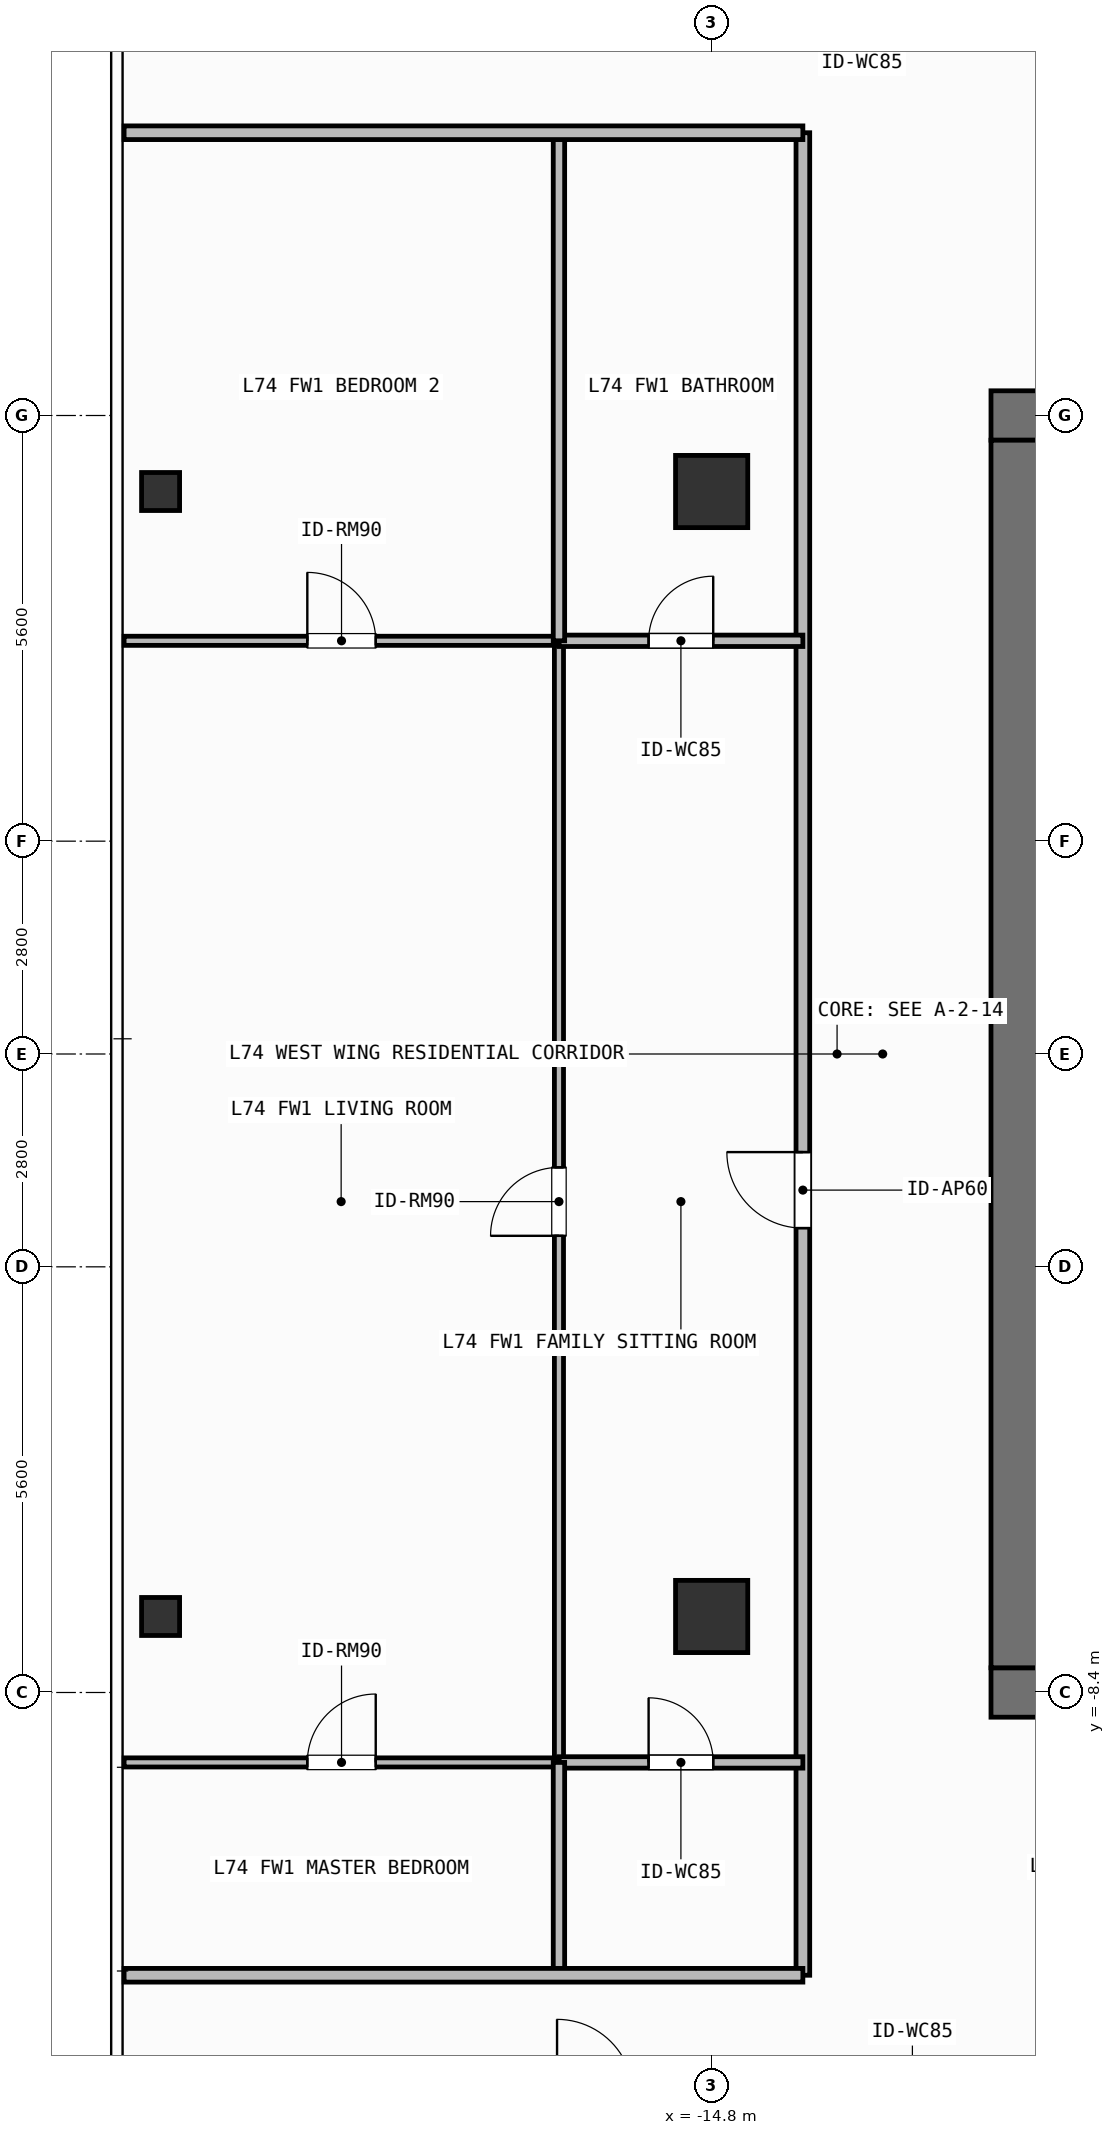
"""IFC4 building model, lengths in metres.
Left out: names, types, materials, properties, quantities, classifications, styles, units other than length and angle.
Written with IfcOpenShell. Run it as: python <this file> out.ifc"""

import sys

from ifc_helpers import new_model, si_unit, direction, frame, frame_2d, origin, origin_2d, place, context, subcontext, project, spatial, rectangle, hollow_rectangle, extrude, element, fill, save


model = new_model("IFC4")
c1 = context("Model", 3, precision=1e-05, world=origin(), true_north=direction((0.0, 1.0)))
c2 = subcontext(c1, "Body", "Model", "MODEL_VIEW")
j1 = project(units=[si_unit("LENGTHUNIT", "METRE"), si_unit("PLANEANGLEUNIT", "RADIAN")], contexts=[c1])
p1 = place(None, origin())
s1 = spatial("IfcSite", under=j1, at=p1, CompositionType="ELEMENT")
p2 = place(p1, origin())
s2 = spatial("IfcBuilding", under=s1, at=p2, CompositionType="ELEMENT")
p3 = place(p2, frame((0.0, 0.0, 301.5)))
s3 = spatial("IfcBuildingStorey", under=s2, at=p3, CompositionType="ELEMENT", Elevation=301.5)
for number, where, z_axis, x_axis in (
    (1, (-11.125, -8.4, 0.0), (0.0, 0.0, 1.0), (1.0, 0.0, 0.0)),
    (2, (-11.125, 8.4, 0.0), (0.0, 0.0, 1.0), (1.0, 0.0, 0.0)),
):
    element("IfcWall", number, at=place(p3, frame(where, z_axis=z_axis, x_axis=x_axis)), inside=s3, PredefinedType="SHEAR", context=c2, shape_type="SweptSolid", body=[
        extrude(rectangle(XDim=1.425, YDim=0.65, at=frame_2d((0.712, 0.0))), origin(), (0.0, 0.0, 1.0), 3.9),
    ])
p4 = place(p3, frame((-10.8, -8.075, 0.0), z_axis=(0.0, 0.0, 1.0), x_axis=(0.0, 1.0, 0.0)))
e3 = element("IfcWall", 3, at=p4, inside=s3, PredefinedType="SHEAR", context=c2, shape_type="SweptSolid", body=[
    extrude(rectangle(XDim=16.15, YDim=0.65, at=frame_2d((8.075, 0.0))), origin(), (0.0, 0.0, 1.0), 3.9),
])
for number, where, z_axis, x_axis in (
    (4, (-14.8, -7.4, 0.0), (0.0, 0.0, 1.0), (1.0, 0.0, 0.0)),
    (5, (-14.8, 7.4, 0.0), (0.0, 0.0, 1.0), (1.0, 0.0, 0.0)),
):
    element("IfcColumn", number, at=place(p3, frame(where, z_axis=z_axis, x_axis=x_axis)), inside=s3, PredefinedType="COLUMN", context=c2, shape_type="SweptSolid", body=[
        extrude(rectangle(XDim=0.95, YDim=0.95, at=origin_2d()), origin(), (0.0, 0.0, 1.0), 3.9),
    ])
for number, where, z_axis, x_axis in (
    (6, (-22.05, -7.4, 0.0), (0.0, 0.0, 1.0), (1.0, 0.0, 0.0)),
    (7, (-22.05, 7.4, 0.0), (0.0, 0.0, 1.0), (1.0, 0.0, 0.0)),
):
    element("IfcColumn", number, at=place(p3, frame(where, z_axis=z_axis, x_axis=x_axis)), inside=s3, PredefinedType="COLUMN", context=c2, shape_type="SweptSolid", body=[
        extrude(hollow_rectangle(XDim=0.5, YDim=0.5, WallThickness=0.025, at=origin_2d()), origin(), (0.0, 0.0, 1.0), 3.9),
    ])
p5 = place(p3, frame((-13.6, -12.12, 0.0), z_axis=(0.0, 0.0, 1.0), x_axis=(0.0, 1.0, 0.0)))
e8 = element("IfcWall", 8, at=p5, inside=s3, PredefinedType="PARTITIONING", context=c2, shape_type="SweptSolid", body=[
    extrude(rectangle(XDim=24.24, YDim=0.18, at=frame_2d((12.12, 0.0))), origin(), (0.0, 0.0, 1.0), 3.68),
])
p6 = place(p5, frame((9.829, 0.0, 0.0)))
e9 = element("IfcOpeningElement", 9, at=p6, cuts=e8, PredefinedType="OPENING", context=c2, shape_type="SweptSolid", body=[
    extrude(rectangle(XDim=1.0, YDim=2.2, at=frame_2d((0.5, 1.1))), frame((0.0, 0.1, 0.0), z_axis=(0.0, -1.0, 0.0), x_axis=(1.0, 0.0, 0.0)), (0.0, 0.0, 1.0), 0.2),
])
p7 = place(p3, frame((-16.809, -9.32, 0.0), z_axis=(0.0, 0.0, 1.0), x_axis=(0.0, 1.0, 0.0)))
e10 = element("IfcWall", 10, at=p7, inside=s3, PredefinedType="PARTITIONING", context=c2, shape_type="SweptSolid", body=[
    extrude(rectangle(XDim=14.756, YDim=0.12, at=frame_2d((7.378, 0.0))), origin(), (0.0, 0.0, 1.0), 3.68),
])
p8 = place(p7, frame((6.928, 0.0, 0.0)))
e11 = element("IfcOpeningElement", 11, at=p8, cuts=e10, PredefinedType="OPENING", context=c2, shape_type="SweptSolid", body=[
    extrude(rectangle(XDim=0.9, YDim=2.1, at=frame_2d((0.45, 1.05))), frame((0.0, 0.07, 0.0), z_axis=(0.0, -1.0, 0.0), x_axis=(1.0, 0.0, 0.0)), (0.0, 0.0, 1.0), 0.14),
])
p9 = place(p3, frame((-16.809, 5.436, 0.0), z_axis=(0.0, 0.0, 1.0), x_axis=(1.0, 0.0, 0.0)))
e12 = element("IfcWall", 12, at=p9, inside=s3, PredefinedType="PARTITIONING", context=c2, shape_type="SweptSolid", body=[
    extrude(rectangle(XDim=3.209, YDim=0.15, at=frame_2d((1.604, 0.0))), origin(), (0.0, 0.0, 1.0), 3.68),
])
p10 = place(p9, frame((1.179, 0.0, 0.0)))
e13 = element("IfcOpeningElement", 13, at=p10, cuts=e12, PredefinedType="OPENING", context=c2, shape_type="SweptSolid", body=[
    extrude(rectangle(XDim=0.85, YDim=2.1, at=frame_2d((0.425, 1.05))), frame((0.0, 0.085, 0.0), z_axis=(0.0, -1.0, 0.0), x_axis=(1.0, 0.0, 0.0)), (0.0, 0.0, 1.0), 0.17),
])
p11 = place(p3, frame((-16.809, -9.32, 0.0), z_axis=(0.0, 0.0, 1.0), x_axis=(1.0, 0.0, 0.0)))
e14 = element("IfcWall", 14, at=p11, inside=s3, PredefinedType="PARTITIONING", context=c2, shape_type="SweptSolid", body=[
    extrude(rectangle(XDim=3.209, YDim=0.15, at=frame_2d((1.604, 0.0))), origin(), (0.0, 0.0, 1.0), 3.68),
])
p12 = place(p11, frame((1.179, 0.0, 0.0)))
e15 = element("IfcOpeningElement", 15, at=p12, cuts=e14, PredefinedType="OPENING", context=c2, shape_type="SweptSolid", body=[
    extrude(rectangle(XDim=0.85, YDim=2.1, at=frame_2d((0.425, 1.05))), frame((0.0, 0.085, 0.0), z_axis=(0.0, -1.0, 0.0), x_axis=(1.0, 0.0, 0.0)), (0.0, 0.0, 1.0), 0.17),
])
p13 = place(p3, frame((-22.53, -9.32, 0.0), z_axis=(0.0, 0.0, 1.0), x_axis=(1.0, 0.0, 0.0)))
e16 = element("IfcWall", 16, at=p13, inside=s3, PredefinedType="PARTITIONING", context=c2, shape_type="SweptSolid", body=[
    extrude(rectangle(XDim=5.721, YDim=0.12, at=frame_2d((2.86, 0.0))), origin(), (0.0, 0.0, 1.0), 3.68),
])
p14 = place(p13, frame((2.41, 0.0, 0.0)))
e17 = element("IfcOpeningElement", 17, at=p14, cuts=e16, PredefinedType="OPENING", context=c2, shape_type="SweptSolid", body=[
    extrude(rectangle(XDim=0.9, YDim=2.1, at=frame_2d((0.45, 1.05))), frame((0.0, 0.07, 0.0), z_axis=(0.0, -1.0, 0.0), x_axis=(1.0, 0.0, 0.0)), (0.0, 0.0, 1.0), 0.14),
])
p15 = place(p3, frame((-22.53, 5.436, 0.0), z_axis=(0.0, 0.0, 1.0), x_axis=(1.0, 0.0, 0.0)))
e18 = element("IfcWall", 18, at=p15, inside=s3, PredefinedType="PARTITIONING", context=c2, shape_type="SweptSolid", body=[
    extrude(rectangle(XDim=5.721, YDim=0.12, at=frame_2d((2.86, 0.0))), origin(), (0.0, 0.0, 1.0), 3.68),
])
p16 = place(p15, frame((2.41, 0.0, 0.0)))
e19 = element("IfcOpeningElement", 19, at=p16, cuts=e18, PredefinedType="OPENING", context=c2, shape_type="SweptSolid", body=[
    extrude(rectangle(XDim=0.9, YDim=2.1, at=frame_2d((0.45, 1.05))), frame((0.0, 0.07, 0.0), z_axis=(0.0, -1.0, 0.0), x_axis=(1.0, 0.0, 0.0)), (0.0, 0.0, 1.0), 0.14),
])
p17 = place(p3, frame((-16.809, -12.12, 0.0), z_axis=(0.0, 0.0, 1.0), x_axis=(0.0, 1.0, 0.0)))
e20 = element("IfcWall", 20, at=p17, inside=s3, PredefinedType="PARTITIONING", context=c2, shape_type="SweptSolid", body=[
    extrude(rectangle(XDim=2.8, YDim=0.15, at=frame_2d((1.4, 0.0))), origin(), (0.0, 0.0, 1.0), 3.68),
])
p18 = place(p3, frame((-16.809, 5.436, 0.0), z_axis=(0.0, 0.0, 1.0), x_axis=(0.0, 1.0, 0.0)))
e21 = element("IfcWall", 21, at=p18, inside=s3, PredefinedType="PARTITIONING", context=c2, shape_type="SweptSolid", body=[
    extrude(rectangle(XDim=6.684, YDim=0.15, at=frame_2d((3.342, 0.0))), origin(), (0.0, 0.0, 1.0), 3.68),
])
for number, where, z_axis, x_axis in (
    (22, (-22.53, -12.12, 0.0), (0.0, 0.0, 1.0), (1.0, 0.0, 0.0)),
    (23, (-22.53, 12.12, 0.0), (0.0, 0.0, 1.0), (1.0, 0.0, 0.0)),
):
    element("IfcWall", number, at=place(p3, frame(where, z_axis=z_axis, x_axis=x_axis)), inside=s3, PredefinedType="PARTITIONING", context=c2, shape_type="SweptSolid", body=[
        extrude(rectangle(XDim=8.93, YDim=0.18, at=frame_2d((4.465, 0.0))), origin(), (0.0, 0.0, 1.0), 3.68),
    ])
p19 = place(p6, origin())
e24 = element("IfcDoor", 24, at=p19, inside=s3, OperationType="SINGLE_SWING_RIGHT", PredefinedType="DOOR", context=c2, shape_type="SweptSolid", body=[
    extrude(rectangle(XDim=1.0, YDim=2.2, at=frame_2d((0.5, 1.1))), frame((0.0, 0.025, 0.0), z_axis=(0.0, -1.0, 0.0), x_axis=(1.0, 0.0, 0.0)), (0.0, 0.0, 1.0), 0.05),
])
fill(e9, e24)
p20 = place(p8, origin())
e25 = element("IfcDoor", 25, at=p20, inside=s3, OperationType="SINGLE_SWING_LEFT", PredefinedType="DOOR", context=c2, shape_type="SweptSolid", body=[
    extrude(rectangle(XDim=0.9, YDim=2.1, at=frame_2d((0.45, 1.05))), frame((0.0, 0.025, 0.0), z_axis=(0.0, -1.0, 0.0), x_axis=(1.0, 0.0, 0.0)), (0.0, 0.0, 1.0), 0.05),
])
fill(e11, e25)
p21 = place(p10, origin())
e26 = element("IfcDoor", 26, at=p21, inside=s3, OperationType="SINGLE_SWING_RIGHT", PredefinedType="DOOR", context=c2, shape_type="SweptSolid", body=[
    extrude(rectangle(XDim=0.85, YDim=2.1, at=frame_2d((0.425, 1.05))), frame((0.0, 0.025, 0.0), z_axis=(0.0, -1.0, 0.0), x_axis=(1.0, 0.0, 0.0)), (0.0, 0.0, 1.0), 0.05),
])
fill(e13, e26)
p22 = place(p12, origin())
e27 = element("IfcDoor", 27, at=p22, inside=s3, OperationType="SINGLE_SWING_LEFT", PredefinedType="DOOR", context=c2, shape_type="SweptSolid", body=[
    extrude(rectangle(XDim=0.85, YDim=2.1, at=frame_2d((0.425, 1.05))), frame((0.0, 0.025, 0.0), z_axis=(0.0, -1.0, 0.0), x_axis=(1.0, 0.0, 0.0)), (0.0, 0.0, 1.0), 0.05),
])
fill(e15, e27)
p23 = place(p14, origin())
e28 = element("IfcDoor", 28, at=p23, inside=s3, OperationType="SINGLE_SWING_RIGHT", PredefinedType="DOOR", context=c2, shape_type="SweptSolid", body=[
    extrude(rectangle(XDim=0.9, YDim=2.1, at=frame_2d((0.45, 1.05))), frame((0.0, 0.025, 0.0), z_axis=(0.0, -1.0, 0.0), x_axis=(1.0, 0.0, 0.0)), (0.0, 0.0, 1.0), 0.05),
])
fill(e17, e28)
p24 = place(p16, origin())
e29 = element("IfcDoor", 29, at=p24, inside=s3, OperationType="SINGLE_SWING_LEFT", PredefinedType="DOOR", context=c2, shape_type="SweptSolid", body=[
    extrude(rectangle(XDim=0.9, YDim=2.1, at=frame_2d((0.45, 1.05))), frame((0.0, 0.025, 0.0), z_axis=(0.0, -1.0, 0.0), x_axis=(1.0, 0.0, 0.0)), (0.0, 0.0, 1.0), 0.05),
])
fill(e19, e29)
save(model, sys.argv[1])
